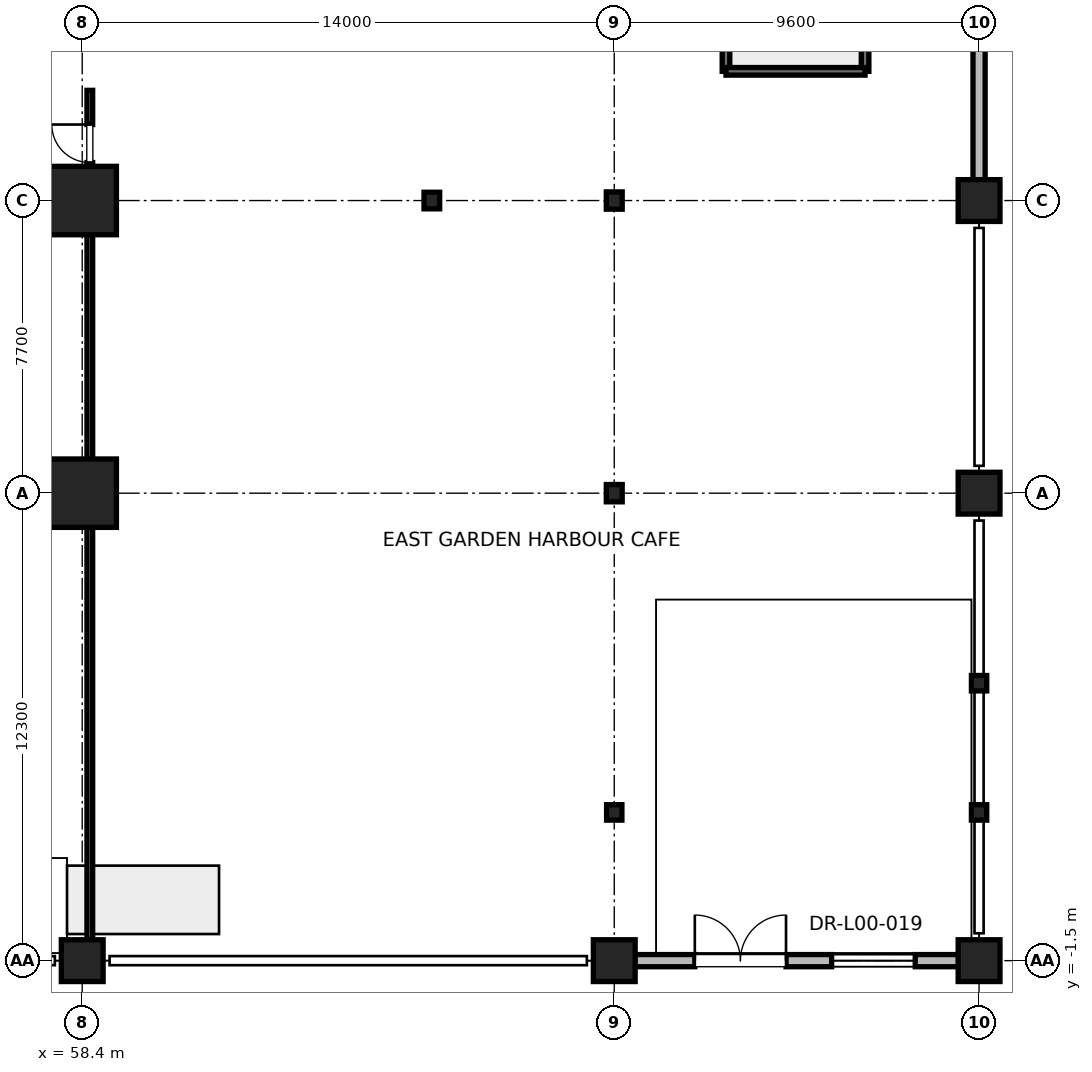
"""IFC4 building model, lengths in metres.
Left out: names, types, materials, properties, quantities, classifications, styles, units other than length and angle.
Written with IfcOpenShell. Run it as: python <this file> out.ifc"""

import sys

from ifc_helpers import new_model, si_unit, direction, frame, frame_2d, origin, origin_2d, place, context, subcontext, project, spatial, rectangle, i_section, extrude, element, fill, save


model = new_model("IFC4")
c1 = context("Model", 3, precision=1e-05, world=origin(), true_north=direction((0.0, 1.0)))
c2 = subcontext(c1, "Body", "Model", "MODEL_VIEW")
j1 = project(units=[si_unit("LENGTHUNIT", "METRE"), si_unit("PLANEANGLEUNIT", "RADIAN")], contexts=[c1])
p1 = place(None, origin())
s1 = spatial("IfcSite", under=j1, at=p1, CompositionType="ELEMENT")
p2 = place(p1, origin())
s2 = spatial("IfcBuilding", under=s1, at=p2, CompositionType="ELEMENT")
p3 = place(p2, origin())
s3 = spatial("IfcBuildingStorey", under=s2, at=p3, CompositionType="ELEMENT", Elevation=0.0)
for number, where, z_axis, x_axis in (
    (1, (58.4, 18.5, 0.0), (0.0, 0.0, 1.0), (1.0, 0.0, 0.0)),
    (2, (58.4, 10.8, 0.0), (0.0, 0.0, 1.0), (1.0, 0.0, 0.0)),
):
    element("IfcColumn", number, at=place(p3, frame(where, z_axis=z_axis, x_axis=x_axis)), inside=s3, PredefinedType="COLUMN", context=c2, shape_type="SweptSolid", body=[
        extrude(rectangle(XDim=1.8, YDim=1.8, at=origin_2d()), origin(), (0.0, 0.0, 1.0), 6.0),
    ])
p4 = place(p3, frame((67.6, 18.5, 0.0), z_axis=(0.0, 0.0, 1.0), x_axis=(1.0, 0.0, 0.0)))
e3 = element("IfcColumn", 3, at=p4, inside=s3, PredefinedType="COLUMN", context=c2, shape_type="SweptSolid", body=[
    extrude(i_section(OverallWidth=0.412, OverallDepth=0.437, WebThickness=0.036, FlangeThickness=0.058, FilletRadius=0.015, at=origin_2d()), origin(), (0.0, 0.0, 1.0), 6.0),
])
for number, where, z_axis, x_axis in (
    (4, (82.0, -1.5, 0.0), (0.0, 0.0, 1.0), (1.0, 0.0, 0.0)),
    (5, (82.0, 10.8, 0.0), (0.0, 0.0, 1.0), (1.0, 0.0, 0.0)),
    (6, (82.0, 18.5, 0.0), (0.0, 0.0, 1.0), (1.0, 0.0, 0.0)),
    (7, (58.4, -1.5, 0.0), (0.0, 0.0, 1.0), (1.0, 0.0, 0.0)),
    (8, (72.4, -1.5, 0.0), (0.0, 0.0, 1.0), (1.0, 0.0, 0.0)),
):
    element("IfcColumn", number, at=place(p3, frame(where, z_axis=z_axis, x_axis=x_axis)), inside=s3, PredefinedType="COLUMN", context=c2, shape_type="SweptSolid", body=[
        extrude(rectangle(XDim=1.1, YDim=1.1, at=origin_2d()), origin(), (0.0, 0.0, 1.0), 6.0),
    ])
for number, where, z_axis, x_axis in (
    (9, (72.4, 10.8, 0.0), (0.0, 0.0, 1.0), (1.0, 0.0, 0.0)),
    (10, (72.4, 18.5, 0.0), (0.0, 0.0, 1.0), (1.0, 0.0, 0.0)),
):
    element("IfcColumn", number, at=place(p3, frame(where, z_axis=z_axis, x_axis=x_axis)), inside=s3, PredefinedType="COLUMN", context=c2, shape_type="SweptSolid", body=[
        extrude(i_section(OverallWidth=0.418, OverallDepth=0.456, WebThickness=0.042, FlangeThickness=0.067, FilletRadius=0.015, at=origin_2d()), origin(), (0.0, 0.0, 1.0), 6.0),
    ])
for number, where, z_axis, x_axis in (
    (11, (72.4, 2.4, 0.0), (0.0, 0.0, 1.0), (1.0, 0.0, 0.0)),
    (12, (82.0, 2.4, 0.0), (0.0, 0.0, 1.0), (1.0, 0.0, 0.0)),
    (13, (82.0, 5.8, 0.0), (0.0, 0.0, 1.0), (1.0, 0.0, 0.0)),
):
    element("IfcColumn", number, at=place(p3, frame(where, z_axis=z_axis, x_axis=x_axis)), inside=s3, PredefinedType="COLUMN", context=c2, shape_type="SweptSolid", body=[
        extrude(i_section(OverallWidth=0.403, OverallDepth=0.406, WebThickness=0.027, FlangeThickness=0.043, FilletRadius=0.015, at=origin_2d()), origin(), (0.0, 0.0, 1.0), 6.0),
    ])
p5 = place(p3, frame((72.94, -1.5, 0.0), z_axis=(0.0, 0.0, 1.0), x_axis=(1.0, 0.0, 0.0)))
e14 = element("IfcWall", 14, at=p5, inside=s3, PredefinedType="SOLIDWALL", context=c2, shape_type="SweptSolid", body=[
    extrude(rectangle(XDim=8.52, YDim=0.32, at=frame_2d((4.26, 0.0))), origin(), (0.0, 0.0, 1.0), 4.759),
])
p6 = place(p5, frame((1.58, 0.0, 0.0)))
e15 = element("IfcOpeningElement", 15, at=p6, cuts=e14, PredefinedType="OPENING", context=c2, shape_type="SweptSolid", body=[
    extrude(rectangle(XDim=2.4, YDim=2.8, at=frame_2d((1.2, 1.4))), frame((0.0, 0.16, 0.0), z_axis=(0.0, -1.0, 0.0), x_axis=(1.0, 0.0, 0.0)), (0.0, 0.0, 1.0), 0.32),
])
p7 = place(p5, frame((5.18, 0.0, 0.85)))
e16 = element("IfcOpeningElement", 16, at=p7, cuts=e14, PredefinedType="OPENING", context=c2, shape_type="SweptSolid", body=[
    extrude(rectangle(XDim=2.2, YDim=2.35, at=frame_2d((1.1, 1.175))), frame((0.0, 0.16, 0.0), z_axis=(0.0, -1.0, 0.0), x_axis=(1.0, 0.0, 0.0)), (0.0, 0.0, 1.0), 0.32),
])
p8 = place(p3, frame((82.0, 35.96, 0.0), z_axis=(0.0, 0.0, 1.0), x_axis=(0.0, -1.0, 0.0)))
e17 = element("IfcWall", 17, at=p8, inside=s3, PredefinedType="SOLIDWALL", context=c2, shape_type="SweptSolid", body=[
    extrude(rectangle(XDim=16.92, YDim=0.32, at=frame_2d((8.46, 0.0))), origin(), (0.0, 0.0, 1.0), 4.759),
])
p9 = place(p8, frame((3.01, 0.0, 0.0)))
e18 = element("IfcOpeningElement", 18, at=p9, cuts=e17, PredefinedType="OPENING", context=c2, shape_type="SweptSolid", body=[
    extrude(rectangle(XDim=1.8, YDim=2.4, at=frame_2d((0.9, 1.2))), frame((0.0, 0.16, 0.0), z_axis=(0.0, -1.0, 0.0), x_axis=(1.0, 0.0, 0.0)), (0.0, 0.0, 1.0), 0.32),
])
p10 = place(p8, frame((9.68, 0.0, 0.9)))
e19 = element("IfcOpeningElement", 19, at=p10, cuts=e17, PredefinedType="OPENING", context=c2, shape_type="SweptSolid", body=[
    extrude(rectangle(XDim=2.4, YDim=2.4, at=frame_2d((1.2, 1.2))), frame((0.0, 0.16, 0.0), z_axis=(0.0, -1.0, 0.0), x_axis=(1.0, 0.0, 0.0)), (0.0, 0.0, 1.0), 0.32),
])
for number, where, z_axis, x_axis in (
    (20, (75.34, 21.9, 0.0), (0.0, 0.0, 1.0), (0.0, 1.0, 0.0)),
    (21, (79.0, 21.9, 0.0), (0.0, 0.0, 1.0), (0.0, 1.0, 0.0)),
):
    element("IfcWall", number, at=place(p3, frame(where, z_axis=z_axis, x_axis=x_axis)), inside=s3, PredefinedType="SOLIDWALL", context=c2, shape_type="SweptSolid", body=[
        extrude(rectangle(XDim=8.7, YDim=0.2, at=frame_2d((4.35, 0.0))), origin(), (0.0, 0.0, 1.0), 5.72),
    ])
p11 = place(p3, frame((75.34, 21.9, 0.0), z_axis=(0.0, 0.0, 1.0), x_axis=(1.0, 0.0, 0.0)))
e22 = element("IfcWall", 22, at=p11, inside=s3, PredefinedType="SOLIDWALL", context=c2, shape_type="SweptSolid", body=[
    extrude(rectangle(XDim=3.66, YDim=0.2, at=frame_2d((1.83, 0.0))), origin(), (0.0, 0.0, 1.0), 5.72),
])
p12 = place(p3, frame((58.6, -1.35, 0.0), z_axis=(0.0, 0.0, 1.0), x_axis=(0.0, 1.0, 0.0)))
e23 = element("IfcWall", 23, at=p12, inside=s3, PredefinedType="PARTITIONING", context=c2, shape_type="SweptSolid", body=[
    extrude(rectangle(XDim=22.75, YDim=0.15, at=frame_2d((11.375, 0.0))), origin(), (0.0, 0.0, 1.0), 2.85),
])
p13 = place(p12, frame((20.85, 0.0, 0.0)))
e24 = element("IfcOpeningElement", 24, at=p13, cuts=e23, PredefinedType="OPENING", context=c2, shape_type="SweptSolid", body=[
    extrude(rectangle(XDim=1.0, YDim=2.15, at=frame_2d((0.5, 1.075))), frame((0.0, 0.075, 0.0), z_axis=(0.0, -1.0, 0.0), x_axis=(1.0, 0.0, 0.0)), (0.0, 0.0, 1.0), 0.15),
])
p14 = place(p6, origin())
e25 = element("IfcDoor", 25, at=p14, inside=s3, OperationType="DOUBLE_DOOR_SINGLE_SWING", PredefinedType="DOOR", context=c2, shape_type="SweptSolid", body=[
    extrude(rectangle(XDim=2.4, YDim=2.8, at=frame_2d((1.2, 1.4))), frame((0.0, 0.025, 0.0), z_axis=(0.0, -1.0, 0.0), x_axis=(1.0, 0.0, 0.0)), (0.0, 0.0, 1.0), 0.05),
])
fill(e15, e25)
p15 = place(p7, origin())
e26 = element("IfcWindow", 26, at=p15, inside=s3, PartitioningType="SINGLE_PANEL", PredefinedType="WINDOW", context=c2, shape_type="SweptSolid", body=[
    extrude(rectangle(XDim=2.2, YDim=2.35, at=frame_2d((1.1, 1.175))), frame((0.0, 0.03, 0.0), z_axis=(0.0, -1.0, 0.0), x_axis=(1.0, 0.0, 0.0)), (0.0, 0.0, 1.0), 0.06),
])
fill(e16, e26)
p16 = place(p13, origin())
e27 = element("IfcDoor", 27, at=p16, inside=s3, OperationType="SINGLE_SWING_RIGHT", PredefinedType="DOOR", context=c2, shape_type="SweptSolid", body=[
    extrude(rectangle(XDim=1.0, YDim=2.15, at=frame_2d((0.5, 1.075))), frame((0.0, 0.025, 0.0), z_axis=(0.0, -1.0, 0.0), x_axis=(1.0, 0.0, 0.0)), (0.0, 0.0, 1.0), 0.05),
])
fill(e24, e27)
save(model, sys.argv[1])
